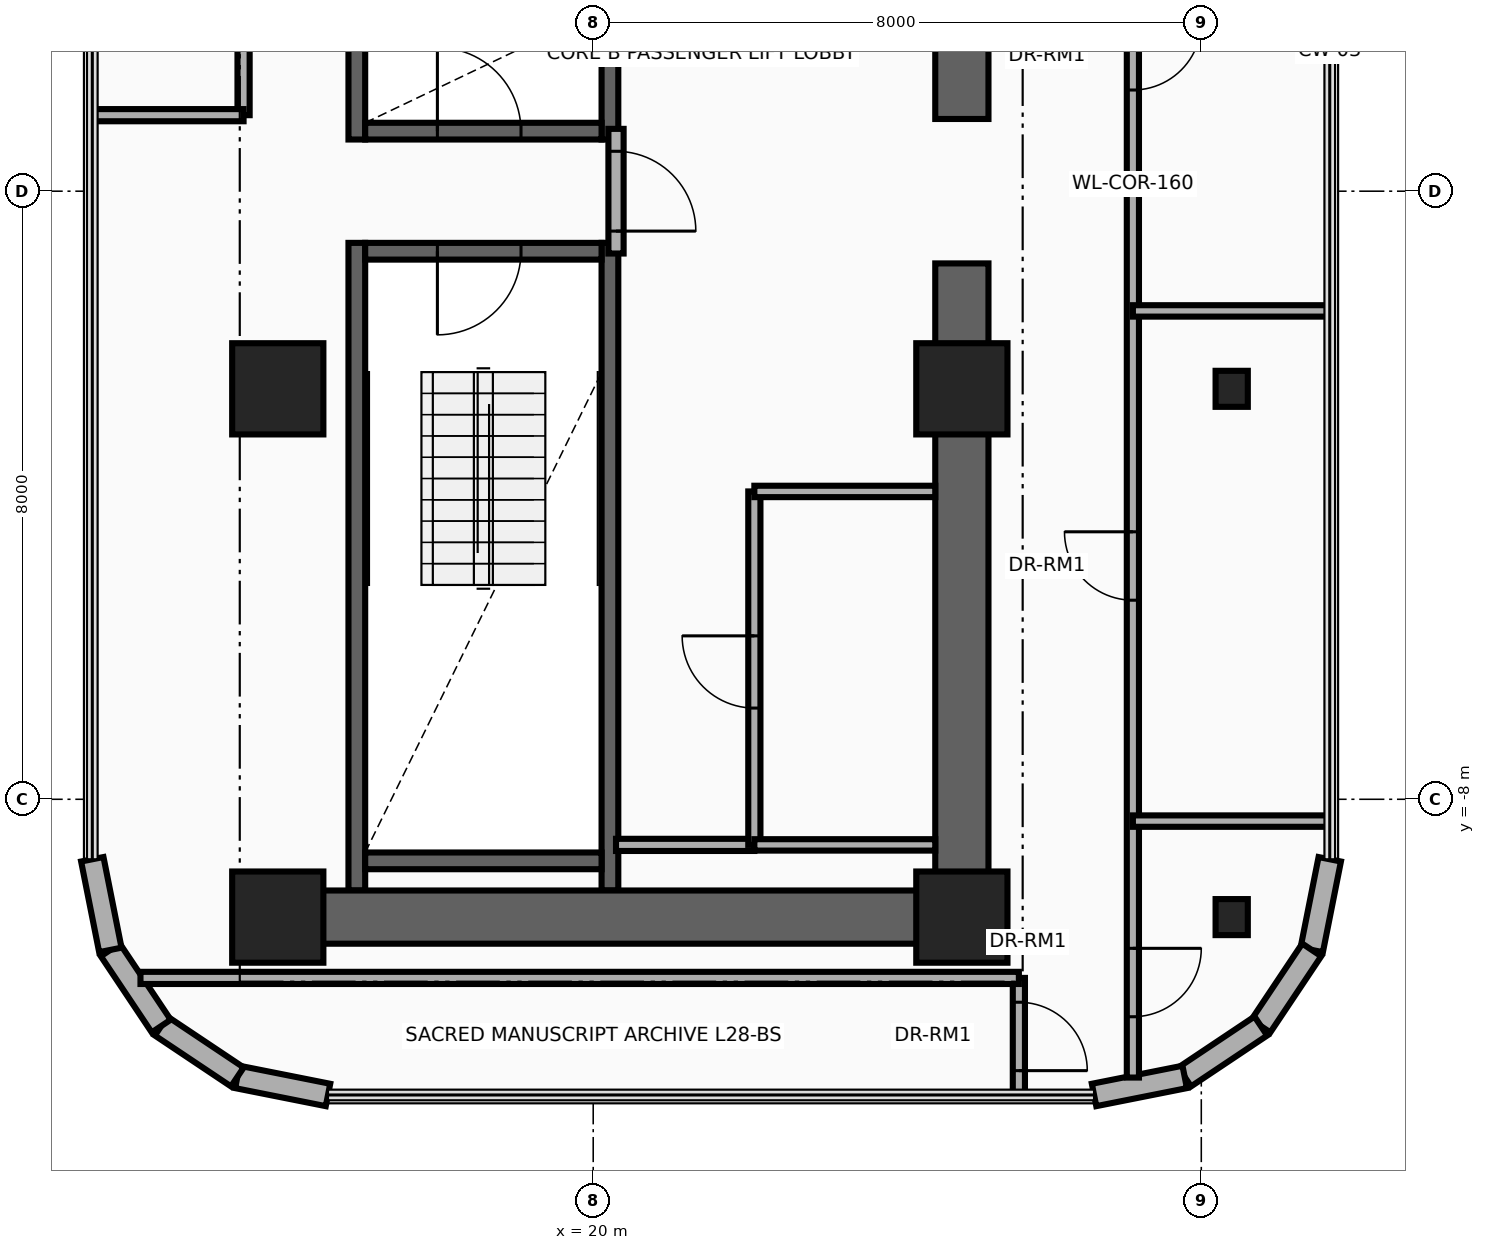
"""IFC4 building model, lengths in metres.
Left out: names, types, materials, properties, quantities, classifications, styles, units other than length and angle.
Written with IfcOpenShell. Run it as: python <this file> out.ifc"""

import sys

from ifc_helpers import new_model, si_unit, direction, frame, frame_2d, origin, origin_2d, place, context, subcontext, project, spatial, rectangle, i_section, extrude, source, transform, mapped, element, fill, save


model = new_model("IFC4")
c1 = context("Model", 3, precision=1e-05, world=origin(), true_north=direction((0.0, 1.0)))
c2 = subcontext(c1, "Body", "Model", "MODEL_VIEW")
j1 = project(units=[si_unit("LENGTHUNIT", "METRE"), si_unit("PLANEANGLEUNIT", "RADIAN")], contexts=[c1])
p1 = place(None, origin())
s1 = spatial("IfcSite", under=j1, at=p1, CompositionType="ELEMENT")
p2 = place(p1, origin())
s2 = spatial("IfcBuilding", under=s1, at=p2, CompositionType="ELEMENT")
p3 = place(p2, frame((0.0, 0.0, 113.1)))
s3 = spatial("IfcBuildingStorey", under=s2, at=p3, CompositionType="ELEMENT", Elevation=113.1)
for number, where, z_axis, x_axis in (
    (1, (16.89, 0.68, 0.0), (0.0, 0.0, 1.0), (0.0, 1.0, 0.0)),
    (2, (20.22, 0.68, 0.0), (0.0, 0.0, 1.0), (0.0, 1.0, 0.0)),
):
    element("IfcWall", number, at=place(p3, frame(where, z_axis=z_axis, x_axis=x_axis)), inside=s3, PredefinedType="SHEAR", context=c2, shape_type="SweptSolid", body=[
        extrude(rectangle(XDim=8.52, YDim=0.22, at=frame_2d((4.26, 0.0))), origin(), (0.0, 0.0, 1.0), 3.46),
    ])
p4 = place(p3, frame((17.0, 0.79, 0.0), z_axis=(0.0, 0.0, 1.0), x_axis=(1.0, 0.0, 0.0)))
e3 = element("IfcWall", 3, at=p4, inside=s3, PredefinedType="SHEAR", context=c2, shape_type="SweptSolid", body=[
    extrude(rectangle(XDim=3.11, YDim=0.22, at=frame_2d((1.555, 0.0))), origin(), (0.0, 0.0, 1.0), 3.46),
])
p5 = place(p4, frame((0.95, 0.0, 0.0)))
e4 = element("IfcOpeningElement", 4, at=p5, cuts=e3, PredefinedType="OPENING", context=c2, shape_type="SweptSolid", body=[
    extrude(rectangle(XDim=1.1, YDim=2.15, at=frame_2d((0.55, 1.075))), frame((0.0, 0.125, 0.0), z_axis=(0.0, -1.0, 0.0), x_axis=(1.0, 0.0, 0.0)), (0.0, 0.0, 1.0), 0.25),
])
for number, where, z_axis, x_axis in (
    (5, (16.89, -9.2, 0.0), (0.0, 0.0, 1.0), (0.0, 1.0, 0.0)),
    (6, (20.22, -9.2, 0.0), (0.0, 0.0, 1.0), (0.0, 1.0, 0.0)),
):
    element("IfcWall", number, at=place(p3, frame(where, z_axis=z_axis, x_axis=x_axis)), inside=s3, PredefinedType="SHEAR", context=c2, shape_type="SweptSolid", body=[
        extrude(rectangle(XDim=8.52, YDim=0.22, at=frame_2d((4.26, 0.0))), origin(), (0.0, 0.0, 1.0), 3.46),
    ])
p6 = place(p3, frame((17.0, -8.81, 0.0), z_axis=(0.0, 0.0, 1.0), x_axis=(1.0, 0.0, 0.0)))
e7 = element("IfcWall", 7, at=p6, inside=s3, PredefinedType="SHEAR", context=c2, shape_type="SweptSolid", body=[
    extrude(rectangle(XDim=3.11, YDim=0.22, at=frame_2d((1.555, 0.0))), origin(), (0.0, 0.0, 1.0), 3.46),
])
p7 = place(p3, frame((17.0, -0.79, 0.0), z_axis=(0.0, 0.0, 1.0), x_axis=(1.0, 0.0, 0.0)))
e8 = element("IfcWall", 8, at=p7, inside=s3, PredefinedType="SHEAR", context=c2, shape_type="SweptSolid", body=[
    extrude(rectangle(XDim=3.11, YDim=0.22, at=frame_2d((1.555, 0.0))), origin(), (0.0, 0.0, 1.0), 3.46),
])
p8 = place(p7, frame((0.95, 0.0, 0.0)))
e9 = element("IfcOpeningElement", 9, at=p8, cuts=e8, PredefinedType="OPENING", context=c2, shape_type="SweptSolid", body=[
    extrude(rectangle(XDim=1.1, YDim=2.15, at=frame_2d((0.55, 1.075))), frame((0.0, 0.125, 0.0), z_axis=(0.0, -1.0, 0.0), x_axis=(1.0, 0.0, 0.0)), (0.0, 0.0, 1.0), 0.25),
])
for number, where, z_axis, x_axis in (
    (10, (24.85, -9.9, 0.0), (0.0, 0.0, 1.0), (0.0, 1.0, 0.0)),
    (11, (24.85, 0.95, 0.0), (0.0, 0.0, 1.0), (0.0, 1.0, 0.0)),
):
    element("IfcWall", number, at=place(p3, frame(where, z_axis=z_axis, x_axis=x_axis)), inside=s3, PredefinedType="SHEAR", context=c2, shape_type="SweptSolid", body=[
        extrude(rectangle(XDim=8.95, YDim=0.7, at=frame_2d((4.475, 0.0))), origin(), (0.0, 0.0, 1.0), 3.46),
    ])
p9 = place(p3, frame((15.85, -9.55, 0.0), z_axis=(0.0, 0.0, 1.0), x_axis=(1.0, 0.0, 0.0)))
e12 = element("IfcWall", 12, at=p9, inside=s3, PredefinedType="SHEAR", context=c2, shape_type="SweptSolid", body=[
    extrude(rectangle(XDim=9.0, YDim=0.7, at=frame_2d((4.5, 0.0))), origin(), (0.0, 0.0, 1.0), 3.46),
])
m1 = source(origin(), c2, "Body", "SweptSolid", [
    extrude(rectangle(XDim=1.2, YDim=1.2, at=origin_2d()), origin(), (0.0, 0.0, 1.0), 3.7),
])
for number, where, z_axis, x_axis in (
    (13, (15.85, -9.55, 0.0), (0.0, 0.0, 1.0), (1.0, 0.0, 0.0)),
    (14, (24.85, -9.55, 0.0), (0.0, 0.0, 1.0), (1.0, 0.0, 0.0)),
):
    element("IfcColumn", number, at=place(p3, frame(where, z_axis=z_axis, x_axis=x_axis)), inside=s3, PredefinedType="COLUMN", context=c2, shape_type="MappedRepresentation", body=[
        mapped(m1, transform((0.0, 0.0, 0.0), x_axis=(1.0, 0.0, 0.0), y_axis=(0.0, 1.0, 0.0), z_axis=(0.0, 0.0, 1.0), scale=1.0)),
    ])
m2 = source(origin(), c2, "Body", "SweptSolid", [
    extrude(i_section(OverallWidth=0.424, OverallDepth=0.474, WebThickness=0.048, FlangeThickness=0.077, at=origin_2d()), origin(), (0.0, 0.0, 1.0), 3.7),
])
p10 = place(p3, frame((28.4, -9.55, 0.0), z_axis=(0.0, 0.0, 1.0), x_axis=(1.0, 0.0, 0.0)))
e15 = element("IfcColumn", 15, at=p10, inside=s3, PredefinedType="COLUMN", context=c2, shape_type="MappedRepresentation", body=[
    mapped(m2, transform((0.0, 0.0, 0.0), x_axis=(1.0, 0.0, 0.0), y_axis=(0.0, 1.0, 0.0), z_axis=(0.0, 0.0, 1.0), scale=1.0)),
])
for number, where, z_axis, x_axis in (
    (16, (15.85, -2.6, 0.0), (0.0, 0.0, 1.0), (1.0, 0.0, 0.0)),
    (17, (24.85, -2.6, 0.0), (0.0, 0.0, 1.0), (1.0, 0.0, 0.0)),
):
    element("IfcColumn", number, at=place(p3, frame(where, z_axis=z_axis, x_axis=x_axis)), inside=s3, PredefinedType="COLUMN", context=c2, shape_type="MappedRepresentation", body=[
        mapped(m1, transform((0.0, 0.0, 0.0), x_axis=(1.0, 0.0, 0.0), y_axis=(0.0, 1.0, 0.0), z_axis=(0.0, 0.0, 1.0), scale=1.0)),
    ])
p11 = place(p3, frame((28.4, -2.6, 0.0), z_axis=(0.0, 0.0, 1.0), x_axis=(1.0, 0.0, 0.0)))
e18 = element("IfcColumn", 18, at=p11, inside=s3, PredefinedType="COLUMN", context=c2, shape_type="MappedRepresentation", body=[
    mapped(m2, transform((0.0, 0.0, 0.0), x_axis=(1.0, 0.0, 0.0), y_axis=(0.0, 1.0, 0.0), z_axis=(0.0, 0.0, 1.0), scale=1.0)),
])
p12 = place(p3, frame((29.69, -8.789, 0.0), z_axis=(0.0, 0.0, 1.0), x_axis=(-0.194996050505, -0.980804027463, 0.0)))
e19 = element("IfcWall", 19, at=p12, inside=s3, PredefinedType="SOLIDWALL", context=c2, shape_type="SweptSolid", body=[
    extrude(rectangle(XDim=1.216, YDim=0.3, at=frame_2d((0.608, 0.0))), origin(), (0.0, 0.0, 1.0), 3.46),
])
for number, where, z_axis, x_axis in (
    (20, (29.453, -9.982, 0.0), (0.0, 0.0, 1.0), (-0.556, -0.831, 0.0)),
    (21, (28.783, -10.983, 0.0), (0.0, 0.0, 1.0), (-0.831, -0.556, 0.0)),
):
    element("IfcWall", number, at=place(p3, frame(where, z_axis=z_axis, x_axis=x_axis)), inside=s3, PredefinedType="SOLIDWALL", context=c2, shape_type="SweptSolid", body=[
        extrude(rectangle(XDim=1.205, YDim=0.3, at=frame_2d((0.603, 0.0))), origin(), (0.0, 0.0, 1.0), 3.46),
    ])
p13 = place(p3, frame((27.782, -11.653, 0.0), z_axis=(0.0, 0.0, 1.0), x_axis=(-0.980811661072, -0.194957650543, 0.0)))
e22 = element("IfcWall", 22, at=p13, inside=s3, PredefinedType="SOLIDWALL", context=c2, shape_type="SweptSolid", body=[
    extrude(rectangle(XDim=1.216, YDim=0.3, at=frame_2d((0.608, 0.0))), origin(), (0.0, 0.0, 1.0), 3.46),
])
p14 = place(p3, frame((16.511, -11.89, 0.0), z_axis=(0.0, 0.0, 1.0), x_axis=(-0.980804027463, 0.194996050505, 0.0)))
e23 = element("IfcWall", 23, at=p14, inside=s3, PredefinedType="SOLIDWALL", context=c2, shape_type="SweptSolid", body=[
    extrude(rectangle(XDim=1.216, YDim=0.3, at=frame_2d((0.608, 0.0))), origin(), (0.0, 0.0, 1.0), 3.46),
])
for number, where, z_axis, x_axis in (
    (24, (15.318, -11.653, 0.0), (0.0, 0.0, 1.0), (-0.831, 0.556, 0.0)),
    (25, (14.317, -10.983, 0.0), (0.0, 0.0, 1.0), (-0.556, 0.831, 0.0)),
):
    element("IfcWall", number, at=place(p3, frame(where, z_axis=z_axis, x_axis=x_axis)), inside=s3, PredefinedType="SOLIDWALL", context=c2, shape_type="SweptSolid", body=[
        extrude(rectangle(XDim=1.205, YDim=0.3, at=frame_2d((0.603, 0.0))), origin(), (0.0, 0.0, 1.0), 3.46),
    ])
p15 = place(p3, frame((13.647, -9.982, 0.0), z_axis=(0.0, 0.0, 1.0), x_axis=(-0.195189223115, 0.980765602568, 0.0)))
e26 = element("IfcWall", 26, at=p15, inside=s3, PredefinedType="SOLIDWALL", context=c2, shape_type="SweptSolid", body=[
    extrude(rectangle(XDim=1.216, YDim=0.3, at=frame_2d((0.608, 0.0))), origin(), (0.0, 0.0, 1.0), 3.46),
])
p16 = place(p3, frame((20.3, -0.82, 0.0), z_axis=(0.0, 0.0, 1.0), x_axis=(0.0, 1.0, 0.0)))
e27 = element("IfcWall", 27, at=p16, inside=s3, PredefinedType="PARTITIONING", context=c2, shape_type="SweptSolid", body=[
    extrude(rectangle(XDim=1.64, YDim=0.2, at=frame_2d((0.82, 0.0))), origin(), (0.0, 0.0, 1.0), 3.46),
])
p17 = place(p16, frame((0.295, 0.0, 0.0)))
e28 = element("IfcOpeningElement", 28, at=p17, cuts=e27, PredefinedType="OPENING", context=c2, shape_type="SweptSolid", body=[
    extrude(rectangle(XDim=1.05, YDim=2.15, at=frame_2d((0.525, 1.075))), frame((0.0, 0.115, 0.0), z_axis=(0.0, -1.0, 0.0), x_axis=(1.0, 0.0, 0.0)), (0.0, 0.0, 1.0), 0.23),
])
p18 = place(p3, frame((20.3, -8.6, 0.0), z_axis=(0.0, 0.0, 1.0), x_axis=(1.0, 0.0, 0.0)))
e29 = element("IfcWall", 29, at=p18, inside=s3, PredefinedType="PARTITIONING", context=c2, shape_type="SweptSolid", body=[
    extrude(rectangle(XDim=1.82, YDim=0.16, at=frame_2d((0.91, 0.0))), origin(), (0.0, 0.0, 1.0), 3.46),
])
p19 = place(p3, frame((22.12, -8.6, 0.0), z_axis=(0.0, 0.0, 1.0), x_axis=(0.0, 1.0, 0.0)))
e30 = element("IfcWall", 30, at=p19, inside=s3, PredefinedType="PARTITIONING", context=c2, shape_type="SweptSolid", body=[
    extrude(rectangle(XDim=4.65, YDim=0.16, at=frame_2d((2.325, 0.0))), origin(), (0.0, 0.0, 1.0), 3.46),
])
p20 = place(p19, frame((1.8, 0.0, 0.0)))
e31 = element("IfcOpeningElement", 31, at=p20, cuts=e30, PredefinedType="OPENING", context=c2, shape_type="SweptSolid", body=[
    extrude(rectangle(XDim=0.95, YDim=2.15, at=frame_2d((0.475, 1.075))), frame((0.0, 0.095, 0.0), z_axis=(0.0, -1.0, 0.0), x_axis=(1.0, 0.0, 0.0)), (0.0, 0.0, 1.0), 0.19),
])
for number, where, z_axis, x_axis in (
    (32, (22.12, -3.95, 0.0), (0.0, 0.0, 1.0), (1.0, 0.0, 0.0)),
    (33, (22.12, -8.6, 0.0), (0.0, 0.0, 1.0), (1.0, 0.0, 0.0)),
):
    element("IfcWall", number, at=place(p3, frame(where, z_axis=z_axis, x_axis=x_axis)), inside=s3, PredefinedType="PARTITIONING", context=c2, shape_type="SweptSolid", body=[
        extrude(rectangle(XDim=2.38, YDim=0.15, at=frame_2d((1.19, 0.0))), origin(), (0.0, 0.0, 1.0), 3.46),
    ])
p21 = place(p3, frame((25.6, -11.89, 0.0), z_axis=(0.0, 0.0, 1.0), x_axis=(0.0, 1.0, 0.0)))
e34 = element("IfcWall", 34, at=p21, inside=s3, PredefinedType="PARTITIONING", context=c2, shape_type="SweptSolid", body=[
    extrude(rectangle(XDim=1.54, YDim=0.16, at=frame_2d((0.77, 0.0))), origin(), (0.0, 0.0, 1.0), 3.46),
])
p22 = place(p21, frame((0.32, 0.0, 0.0)))
e35 = element("IfcOpeningElement", 35, at=p22, cuts=e34, PredefinedType="OPENING", context=c2, shape_type="SweptSolid", body=[
    extrude(rectangle(XDim=0.9, YDim=2.1, at=frame_2d((0.45, 1.05))), frame((0.0, 0.095, 0.0), z_axis=(0.0, -1.0, 0.0), x_axis=(1.0, 0.0, 0.0)), (0.0, 0.0, 1.0), 0.19),
])
p23 = place(p3, frame((14.044, -10.35, 0.0), z_axis=(0.0, 0.0, 1.0), x_axis=(1.0, 0.0, 0.0)))
e36 = element("IfcWall", 36, at=p23, inside=s3, PredefinedType="PARTITIONING", context=c2, shape_type="SweptSolid", body=[
    extrude(rectangle(XDim=11.556, YDim=0.16, at=frame_2d((5.778, 0.0))), origin(), (0.0, 0.0, 1.0), 3.46),
])
p24 = place(p3, frame((27.1, -11.661, 0.0), z_axis=(0.0, 0.0, 1.0), x_axis=(0.0, 1.0, 0.0)))
e37 = element("IfcWall", 37, at=p24, inside=s3, PredefinedType="PARTITIONING", context=c2, shape_type="SweptSolid", body=[
    extrude(rectangle(XDim=23.511, YDim=0.16, at=frame_2d((11.755, 0.0))), origin(), (0.0, 0.0, 1.0), 2.666),
])
p25 = place(p24, frame((0.8, 0.0, 0.0)))
e38 = element("IfcOpeningElement", 38, at=p25, cuts=e37, PredefinedType="OPENING", context=c2, shape_type="SweptSolid", body=[
    extrude(rectangle(XDim=0.9, YDim=2.1, at=frame_2d((0.45, 1.05))), frame((0.0, 0.095, 0.0), z_axis=(0.0, -1.0, 0.0), x_axis=(1.0, 0.0, 0.0)), (0.0, 0.0, 1.0), 0.19),
])
p26 = place(p24, frame((6.28, 0.0, 0.0)))
e39 = element("IfcOpeningElement", 39, at=p26, cuts=e37, PredefinedType="OPENING", context=c2, shape_type="SweptSolid", body=[
    extrude(rectangle(XDim=0.9, YDim=2.1, at=frame_2d((0.45, 1.05))), frame((0.0, 0.095, 0.0), z_axis=(0.0, -1.0, 0.0), x_axis=(1.0, 0.0, 0.0)), (0.0, 0.0, 1.0), 0.19),
])
p27 = place(p24, frame((12.992, 0.0, 0.0)))
e40 = element("IfcOpeningElement", 40, at=p27, cuts=e37, PredefinedType="OPENING", context=c2, shape_type="SweptSolid", body=[
    extrude(rectangle(XDim=0.9, YDim=2.1, at=frame_2d((0.45, 1.05))), frame((0.0, 0.095, 0.0), z_axis=(0.0, -1.0, 0.0), x_axis=(1.0, 0.0, 0.0)), (0.0, 0.0, 1.0), 0.19),
])
p28 = place(p24, frame((19.705, 0.0, 0.0)))
e41 = element("IfcOpeningElement", 41, at=p28, cuts=e37, PredefinedType="OPENING", context=c2, shape_type="SweptSolid", body=[
    extrude(rectangle(XDim=0.9, YDim=2.1, at=frame_2d((0.45, 1.05))), frame((0.0, 0.095, 0.0), z_axis=(0.0, -1.0, 0.0), x_axis=(1.0, 0.0, 0.0)), (0.0, 0.0, 1.0), 0.19),
])
for number, where, z_axis, x_axis in (
    (42, (27.1, -8.287, 0.0), (0.0, 0.0, 1.0), (1.0, 0.0, 0.0)),
    (43, (27.1, -1.575, 0.0), (0.0, 0.0, 1.0), (1.0, 0.0, 0.0)),
):
    element("IfcWall", number, at=place(p3, frame(where, z_axis=z_axis, x_axis=x_axis)), inside=s3, PredefinedType="PARTITIONING", context=c2, shape_type="SweptSolid", body=[
        extrude(rectangle(XDim=2.59, YDim=0.15, at=frame_2d((1.295, 0.0))), origin(), (0.0, 0.0, 1.0), 2.896),
    ])
p29 = place(p3, frame((15.4, 1.0, 0.0), z_axis=(0.0, 0.0, 1.0), x_axis=(0.0, 1.0, 0.0)))
e44 = element("IfcWall", 44, at=p29, inside=s3, PredefinedType="PARTITIONING", context=c2, shape_type="SweptSolid", body=[
    extrude(rectangle(XDim=9.35, YDim=0.16, at=frame_2d((4.675, 0.0))), origin(), (0.0, 0.0, 1.0), 2.245),
])
p30 = place(p3, frame((13.41, 1.0, 0.0), z_axis=(0.0, 0.0, 1.0), x_axis=(1.0, 0.0, 0.0)))
e45 = element("IfcWall", 45, at=p30, inside=s3, PredefinedType="PARTITIONING", context=c2, shape_type="SweptSolid", body=[
    extrude(rectangle(XDim=1.99, YDim=0.16, at=frame_2d((0.995, 0.0))), origin(), (0.0, 0.0, 1.0), 2.245),
])
p31 = place(p17, frame((1.05, 0.0, 0.0), z_axis=(0.0, 0.0, 1.0), x_axis=(-1.0, 0.0, 0.0)))
e46 = element("IfcDoor", 46, at=p31, inside=s3, OperationType="SINGLE_SWING_LEFT", PredefinedType="DOOR", context=c2, shape_type="SweptSolid", body=[
    extrude(rectangle(XDim=1.05, YDim=2.15, at=frame_2d((0.525, 1.075))), frame((0.0, 0.025, 0.0), z_axis=(0.0, -1.0, 0.0), x_axis=(1.0, 0.0, 0.0)), (0.0, 0.0, 1.0), 0.05),
])
fill(e28, e46)
p32 = place(p5, origin())
e47 = element("IfcDoor", 47, at=p32, inside=s3, OperationType="SINGLE_SWING_RIGHT", PredefinedType="DOOR", context=c2, shape_type="SweptSolid", body=[
    extrude(rectangle(XDim=1.1, YDim=2.15, at=frame_2d((0.55, 1.075))), frame((0.0, 0.025, 0.0), z_axis=(0.0, -1.0, 0.0), x_axis=(1.0, 0.0, 0.0)), (0.0, 0.0, 1.0), 0.05),
])
fill(e4, e47)
p33 = place(p8, frame((1.1, 0.0, 0.0), z_axis=(0.0, 0.0, 1.0), x_axis=(-1.0, 0.0, 0.0)))
e48 = element("IfcDoor", 48, at=p33, inside=s3, OperationType="SINGLE_SWING_LEFT", PredefinedType="DOOR", context=c2, shape_type="SweptSolid", body=[
    extrude(rectangle(XDim=1.1, YDim=2.15, at=frame_2d((0.55, 1.075))), frame((0.0, 0.025, 0.0), z_axis=(0.0, -1.0, 0.0), x_axis=(1.0, 0.0, 0.0)), (0.0, 0.0, 1.0), 0.05),
])
fill(e9, e48)
p34 = place(p20, origin())
e49 = element("IfcDoor", 49, at=p34, inside=s3, OperationType="SINGLE_SWING_LEFT", PredefinedType="DOOR", context=c2, shape_type="SweptSolid", body=[
    extrude(rectangle(XDim=0.95, YDim=2.15, at=frame_2d((0.475, 1.075))), frame((0.0, 0.025, 0.0), z_axis=(0.0, -1.0, 0.0), x_axis=(1.0, 0.0, 0.0)), (0.0, 0.0, 1.0), 0.05),
])
fill(e31, e49)
p35 = place(p22, frame((0.9, 0.0, 0.0), z_axis=(0.0, 0.0, 1.0), x_axis=(-1.0, 0.0, 0.0)))
e50 = element("IfcDoor", 50, at=p35, inside=s3, OperationType="SINGLE_SWING_LEFT", PredefinedType="DOOR", context=c2, shape_type="SweptSolid", body=[
    extrude(rectangle(XDim=0.9, YDim=2.1, at=frame_2d((0.45, 1.05))), frame((0.0, 0.025, 0.0), z_axis=(0.0, -1.0, 0.0), x_axis=(1.0, 0.0, 0.0)), (0.0, 0.0, 1.0), 0.05),
])
fill(e35, e50)
p36 = place(p25, frame((0.9, 0.0, 0.0), z_axis=(0.0, 0.0, 1.0), x_axis=(-1.0, 0.0, 0.0)))
e51 = element("IfcDoor", 51, at=p36, inside=s3, OperationType="SINGLE_SWING_LEFT", PredefinedType="DOOR", context=c2, shape_type="SweptSolid", body=[
    extrude(rectangle(XDim=0.9, YDim=2.1, at=frame_2d((0.45, 1.05))), frame((0.0, 0.025, 0.0), z_axis=(0.0, -1.0, 0.0), x_axis=(1.0, 0.0, 0.0)), (0.0, 0.0, 1.0), 0.05),
])
fill(e38, e51)
p37 = place(p26, origin())
e52 = element("IfcDoor", 52, at=p37, inside=s3, OperationType="SINGLE_SWING_RIGHT", PredefinedType="DOOR", context=c2, shape_type="SweptSolid", body=[
    extrude(rectangle(XDim=0.9, YDim=2.1, at=frame_2d((0.45, 1.05))), frame((0.0, 0.025, 0.0), z_axis=(0.0, -1.0, 0.0), x_axis=(1.0, 0.0, 0.0)), (0.0, 0.0, 1.0), 0.05),
])
fill(e39, e52)
p38 = place(p27, frame((0.9, 0.0, 0.0), z_axis=(0.0, 0.0, 1.0), x_axis=(-1.0, 0.0, 0.0)))
e53 = element("IfcDoor", 53, at=p38, inside=s3, OperationType="SINGLE_SWING_LEFT", PredefinedType="DOOR", context=c2, shape_type="SweptSolid", body=[
    extrude(rectangle(XDim=0.9, YDim=2.1, at=frame_2d((0.45, 1.05))), frame((0.0, 0.025, 0.0), z_axis=(0.0, -1.0, 0.0), x_axis=(1.0, 0.0, 0.0)), (0.0, 0.0, 1.0), 0.05),
])
fill(e40, e53)
save(model, sys.argv[1])
